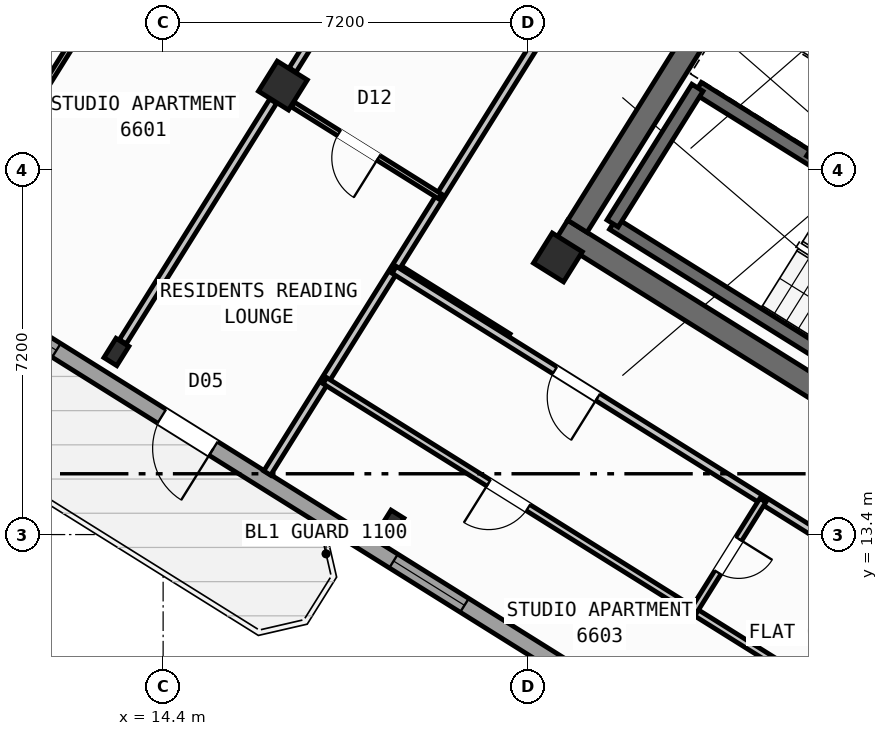
"""IFC4 building model, lengths in metres.
Left out: names, types, materials, properties, quantities, classifications, styles, units other than length and angle.
Written with IfcOpenShell. Run it as: python <this file> out.ifc"""

import sys

from ifc_helpers import new_model, si_unit, direction, frame, frame_2d, origin, origin_2d, place, context, subcontext, project, spatial, rectangle, hollow_rectangle, i_section, extrude, source, transform, mapped, element, fill, save


model = new_model("IFC4")
c1 = context("Model", 3, precision=1e-05, world=origin(), true_north=direction((0.0, 1.0)))
c2 = subcontext(c1, "Body", "Model", "MODEL_VIEW")
j1 = project(units=[si_unit("LENGTHUNIT", "METRE"), si_unit("PLANEANGLEUNIT", "RADIAN")], contexts=[c1])
p1 = place(None, origin())
s1 = spatial("IfcSite", under=j1, at=p1, CompositionType="ELEMENT")
p2 = place(p1, origin())
s2 = spatial("IfcBuilding", under=s1, at=p2, CompositionType="ELEMENT")
p3 = place(p2, frame((0.0, 0.0, 262.8)))
s3 = spatial("IfcBuildingStorey", under=s2, at=p3, CompositionType="ELEMENT", Elevation=262.8)
p4 = place(p3, frame((33.324, 12.503, 0.0), z_axis=(0.0, 0.0, 1.0), x_axis=(-0.848043529849, 0.529926571782, 0.0)))
e1 = element("IfcWall", 1, at=p4, inside=s3, PredefinedType="SHEAR", context=c2, shape_type="SweptSolid", body=[
    extrude(rectangle(XDim=13.04, YDim=0.45, at=frame_2d((6.52, 0.0))), origin(), (0.0, 0.0, 1.0), 3.35),
])
p5 = place(p3, frame((26.007, 24.976, 0.0), z_axis=(0.0, 0.0, 1.0), x_axis=(-0.529931155655, -0.848040665456, 0.0)))
e2 = element("IfcWall", 2, at=p5, inside=s3, PredefinedType="SHEAR", context=c2, shape_type="SweptSolid", body=[
    extrude(rectangle(XDim=6.475, YDim=0.45, at=frame_2d((3.238, 0.0))), origin(), (0.0, 0.0, 1.0), 3.35),
])
m1 = source(origin(), c2, "Body", "SweptSolid", [
    extrude(hollow_rectangle(XDim=0.7, YDim=0.7, WallThickness=0.028, at=origin_2d()), origin(), (0.0, 0.0, 1.0), 3.6),
])
p6 = place(p3, frame((22.191, 18.87, 0.0), z_axis=(0.0, 0.0, 1.0), x_axis=(-0.848048096156, 0.529919264233, 0.0)))
e3 = element("IfcColumn", 3, at=p6, inside=s3, PredefinedType="COLUMN", context=c2, shape_type="MappedRepresentation", body=[
    mapped(m1, transform((0.0, 0.0, 0.0), scale=1.0)),
])
m2 = source(origin(), c2, "Body", "SweptSolid", [
    extrude(i_section(OverallWidth=0.3, OverallDepth=0.45, WebThickness=0.014, FlangeThickness=0.026, at=origin_2d()), origin(), (0.0, 0.0, 1.0), 3.6),
])
p7 = place(p3, frame((18.906, 13.612, 0.0), z_axis=(0.0, 0.0, 1.0), x_axis=(-0.848048096156, 0.529919264233, 0.0)))
e4 = element("IfcColumn", 4, at=p7, inside=s3, PredefinedType="COLUMN", context=c2, shape_type="MappedRepresentation", body=[
    mapped(m2, transform((0.0, 0.0, 0.0), scale=1.0)),
])
p8 = place(p3, frame((16.764, 22.261, 0.0), z_axis=(0.0, 0.0, 1.0), x_axis=(-0.848048096156, 0.529919264233, 0.0)))
e5 = element("IfcColumn", 5, at=p8, inside=s3, PredefinedType="COLUMN", context=c2, shape_type="MappedRepresentation", body=[
    mapped(m1, transform((0.0, 0.0, 0.0), scale=1.0)),
])
p9 = place(p3, frame((13.478, 17.003, 0.0), z_axis=(0.0, 0.0, 1.0), x_axis=(-0.848048096156, 0.529919264233, 0.0)))
e6 = element("IfcColumn", 6, at=p9, inside=s3, PredefinedType="COLUMN", context=c2, shape_type="MappedRepresentation", body=[
    mapped(m2, transform((0.0, 0.0, 0.0), scale=1.0)),
])
p10 = place(p3, frame((29.268, 6.429, 0.0), z_axis=(0.0, 0.0, 1.0), x_axis=(-0.848049971435, 0.529916263149, 0.0)))
e7 = element("IfcWall", 7, at=p10, inside=s3, PredefinedType="STANDARD", context=c2, shape_type="SweptSolid", body=[
    extrude(rectangle(XDim=31.588, YDim=0.32, at=frame_2d((15.794, 0.0))), origin(), (0.0, 0.0, 1.0), 3.35),
])
p11 = place(p10, frame((16.362, 0.0, 0.0)))
e8 = element("IfcOpeningElement", 8, at=p11, cuts=e7, PredefinedType="OPENING", context=c2, shape_type="SweptSolid", body=[
    extrude(rectangle(XDim=1.2, YDim=2.15, at=frame_2d((0.6, 1.075))), frame((0.0, 0.17, 0.0), z_axis=(0.0, -1.0, 0.0), x_axis=(1.0, 0.0, 0.0)), (0.0, 0.0, 1.0), 0.34),
])
p12 = place(p10, frame((3.859, 0.0, 0.9)))
e9 = element("IfcOpeningElement", 9, at=p12, cuts=e7, PredefinedType="OPENING", context=c2, shape_type="SweptSolid", body=[
    extrude(rectangle(XDim=1.65, YDim=1.45, at=frame_2d((0.825, 0.725))), frame((0.0, 0.17, 0.0), z_axis=(0.0, -1.0, 0.0), x_axis=(1.0, 0.0, 0.0)), (0.0, 0.0, 1.0), 0.34),
])
p13 = place(p10, frame((10.519, 0.0, 0.9)))
e10 = element("IfcOpeningElement", 10, at=p13, cuts=e7, PredefinedType="OPENING", context=c2, shape_type="SweptSolid", body=[
    extrude(rectangle(XDim=1.65, YDim=1.45, at=frame_2d((0.825, 0.725))), frame((0.0, 0.17, 0.0), z_axis=(0.0, -1.0, 0.0), x_axis=(1.0, 0.0, 0.0)), (0.0, 0.0, 1.0), 0.34),
])
p14 = place(p10, frame((20.015, 0.0, 0.95)))
e11 = element("IfcOpeningElement", 11, at=p14, cuts=e7, PredefinedType="OPENING", context=c2, shape_type="SweptSolid", body=[
    extrude(rectangle(XDim=1.95, YDim=1.35, at=frame_2d((0.975, 0.675))), frame((0.0, 0.17, 0.0), z_axis=(0.0, -1.0, 0.0), x_axis=(1.0, 0.0, 0.0)), (0.0, 0.0, 1.0), 0.34),
])
p15 = place(p10, frame((23.715, 0.0, 1.0)))
e12 = element("IfcOpeningElement", 12, at=p15, cuts=e7, PredefinedType="OPENING", context=c2, shape_type="SweptSolid", body=[
    extrude(rectangle(XDim=0.9, YDim=1.25, at=frame_2d((0.45, 0.625))), frame((0.0, 0.17, 0.0), z_axis=(0.0, -1.0, 0.0), x_axis=(1.0, 0.0, 0.0)), (0.0, 0.0, 1.0), 0.34),
])
p16 = place(p10, frame((26.391, 0.0, 0.9)))
e13 = element("IfcOpeningElement", 13, at=p16, cuts=e7, PredefinedType="OPENING", context=c2, shape_type="SweptSolid", body=[
    extrude(rectangle(XDim=1.65, YDim=1.45, at=frame_2d((0.825, 0.725))), frame((0.0, 0.17, 0.0), z_axis=(0.0, -1.0, 0.0), x_axis=(1.0, 0.0, 0.0)), (0.0, 0.0, 1.0), 0.34),
])
p17 = place(p10, frame((29.878, 0.0, 1.0)))
e14 = element("IfcOpeningElement", 14, at=p17, cuts=e7, PredefinedType="OPENING", context=c2, shape_type="SweptSolid", body=[
    extrude(rectangle(XDim=0.9, YDim=1.25, at=frame_2d((0.45, 0.625))), frame((0.0, 0.17, 0.0), z_axis=(0.0, -1.0, 0.0), x_axis=(1.0, 0.0, 0.0)), (0.0, 0.0, 1.0), 0.34),
])
p18 = place(p3, frame((29.605, 15.581, 0.0), z_axis=(0.0, 0.0, 1.0), x_axis=(-0.848036911448, 0.529937163087, 0.0)))
e15 = element("IfcWall", 15, at=p18, inside=s3, PredefinedType="SHEAR", context=c2, shape_type="SweptSolid", body=[
    extrude(rectangle(XDim=7.46, YDim=0.26, at=frame_2d((3.73, 0.0))), origin(), (0.0, 0.0, 1.0), 3.35),
])
p19 = place(p3, frame((31.28, 18.261, 0.0), z_axis=(0.0, 0.0, 1.0), x_axis=(-0.848051618787, 0.529913626805, 0.0)))
e16 = element("IfcWall", 16, at=p19, inside=s3, PredefinedType="SHEAR", context=c2, shape_type="SweptSolid", body=[
    extrude(rectangle(XDim=7.46, YDim=0.26, at=frame_2d((3.73, 0.0))), origin(), (0.0, 0.0, 1.0), 3.35),
])
p20 = place(p19, frame((0.36, 0.0, 0.0)))
e17 = element("IfcOpeningElement", 17, at=p20, cuts=e16, PredefinedType="OPENING", context=c2, shape_type="SweptSolid", body=[
    extrude(rectangle(XDim=0.86, YDim=2.05, at=frame_2d((0.43, 1.025))), frame((0.0, 0.14, 0.0), z_axis=(0.0, -1.0, 0.0), x_axis=(1.0, 0.0, 0.0)), (0.0, 0.0, 1.0), 0.28),
])
p21 = place(p3, frame((24.945, 22.22, 0.0), z_axis=(0.0, 0.0, 1.0), x_axis=(-0.529908658664, -0.84805472316, 0.0)))
e18 = element("IfcWall", 18, at=p21, inside=s3, PredefinedType="SHEAR", context=c2, shape_type="SweptSolid", body=[
    extrude(rectangle(XDim=3.16, YDim=0.26, at=frame_2d((1.58, 0.0))), origin(), (0.0, 0.0, 1.0), 3.35),
])
p22 = place(p3, frame((28.71, 23.263, 0.0), z_axis=(0.0, 0.0, 1.0), x_axis=(-0.529907497854, -0.848055448493, 0.0)))
e19 = element("IfcWall", 19, at=p22, inside=s3, PredefinedType="STANDARD", context=c2, shape_type="SweptSolid", body=[
    extrude(rectangle(XDim=2.88, YDim=0.2, at=frame_2d((1.44, 0.0))), origin(), (0.0, 0.0, 1.0), 3.34),
])
p23 = place(p3, frame((31.525, 21.504, 0.0), z_axis=(0.0, 0.0, 1.0), x_axis=(-0.848042066329, 0.529928913853, 0.0)))
e20 = element("IfcWall", 20, at=p23, inside=s3, PredefinedType="STANDARD", context=c2, shape_type="SweptSolid", body=[
    extrude(rectangle(XDim=6.268, YDim=0.2, at=frame_2d((3.134, 0.0))), origin(), (0.0, 0.0, 1.0), 3.34),
])
p24 = place(p23, frame((4.4, 0.0, 0.0)))
e21 = element("IfcOpeningElement", 21, at=p24, cuts=e20, PredefinedType="OPENING", context=c2, shape_type="SweptSolid", body=[
    extrude(rectangle(XDim=0.86, YDim=2.05, at=frame_2d((0.43, 1.025))), frame((0.0, 0.11, 0.0), z_axis=(0.0, -1.0, 0.0), x_axis=(1.0, 0.0, 0.0)), (0.0, 0.0, 1.0), 0.22),
])
p25 = place(p23, frame((1.45, 0.0, 0.0)))
e22 = element("IfcOpeningElement", 22, at=p25, cuts=e20, PredefinedType="OPENING", context=c2, shape_type="SweptSolid", body=[
    extrude(rectangle(XDim=0.86, YDim=2.05, at=frame_2d((0.43, 1.025))), frame((0.0, 0.11, 0.0), z_axis=(0.0, -1.0, 0.0), x_axis=(1.0, 0.0, 0.0)), (0.0, 0.0, 1.0), 0.22),
])
p26 = place(p3, frame((21.206, 17.292, 0.0), z_axis=(0.0, 0.0, 1.0), x_axis=(-0.848050851465, 0.529914854792, 0.0)))
e23 = element("IfcWall", 23, at=p26, inside=s3, PredefinedType="PARTITIONING", context=c2, shape_type="SweptSolid", body=[
    extrude(rectangle(XDim=2.61, YDim=0.16, at=frame_2d((1.305, 0.0))), origin(), (0.0, 0.0, 1.0), 3.34),
])
p27 = place(p3, frame((25.198, 28.606, 0.0), z_axis=(0.0, 0.0, 1.0), x_axis=(-0.529921796515, -0.848046513806, 0.0)))
e24 = element("IfcWall", 24, at=p27, inside=s3, PredefinedType="PARTITIONING", context=c2, shape_type="SweptSolid", body=[
    extrude(rectangle(XDim=16.5, YDim=0.16, at=frame_2d((8.25, 0.0))), origin(), (0.0, 0.0, 1.0), 3.34),
])
p28 = place(p3, frame((20.44, 28.145, 0.0), z_axis=(0.0, 0.0, 1.0), x_axis=(-0.529938869374, -0.84803584519, 0.0)))
e25 = element("IfcWall", 25, at=p28, inside=s3, PredefinedType="PARTITIONING", context=c2, shape_type="SweptSolid", body=[
    extrude(rectangle(XDim=6.576, YDim=0.16, at=frame_2d((3.288, 0.0))), origin(), (0.0, 0.0, 1.0), 2.875),
])
p29 = place(p3, frame((16.572, 21.954, 0.0), z_axis=(0.0, 0.0, 1.0), x_axis=(-0.529904903214, -0.848057069748, 0.0)))
e26 = element("IfcWall", 26, at=p29, inside=s3, PredefinedType="PARTITIONING", context=c2, shape_type="SweptSolid", body=[
    extrude(rectangle(XDim=5.601, YDim=0.16, at=frame_2d((2.801, 0.0))), origin(), (0.0, 0.0, 1.0), 2.875),
])
p30 = place(p3, frame((19.865, 20.073, 0.0), z_axis=(0.0, 0.0, 1.0), x_axis=(-0.84807831592, 0.529870899433, 0.0)))
e27 = element("IfcWall", 27, at=p30, inside=s3, PredefinedType="PARTITIONING", context=c2, shape_type="SweptSolid", body=[
    extrude(rectangle(XDim=3.428, YDim=0.11, at=frame_2d((1.714, 0.0))), origin(), (0.0, 0.0, 1.0), 2.875),
])
p31 = place(p30, frame((1.435, 0.0, 0.0)))
e28 = element("IfcOpeningElement", 28, at=p31, cuts=e27, PredefinedType="OPENING", context=c2, shape_type="SweptSolid", body=[
    extrude(rectangle(XDim=0.92, YDim=2.08, at=frame_2d((0.46, 1.04))), frame((0.0, 0.065, 0.0), z_axis=(0.0, -1.0, 0.0), x_axis=(1.0, 0.0, 0.0)), (0.0, 0.0, 1.0), 0.13),
])
p32 = place(p3, frame((16.191, 28.833, 0.0), z_axis=(0.0, 0.0, 1.0), x_axis=(-0.529921526101, -0.84804668278, 0.0)))
e29 = element("IfcWall", 29, at=p32, inside=s3, PredefinedType="PARTITIONING", context=c2, shape_type="SweptSolid", body=[
    extrude(rectangle(XDim=12.19, YDim=0.11, at=frame_2d((6.095, 0.0))), origin(), (0.0, 0.0, 1.0), 3.34),
])
p33 = place(p32, frame((0.35, 0.0, 0.0)))
e30 = element("IfcOpeningElement", 30, at=p33, cuts=e29, PredefinedType="OPENING", context=c2, shape_type="SweptSolid", body=[
    extrude(rectangle(XDim=0.92, YDim=2.08, at=frame_2d((0.46, 1.04))), frame((0.0, 0.065, 0.0), z_axis=(0.0, -1.0, 0.0), x_axis=(1.0, 0.0, 0.0)), (0.0, 0.0, 1.0), 0.13),
])
p34 = place(p3, frame((13.486, 35.924, 0.0), z_axis=(0.0, 0.0, 1.0), x_axis=(-0.529920421309, -0.848047373134, 0.0)))
e31 = element("IfcWall", 31, at=p34, inside=s3, PredefinedType="PARTITIONING", context=c2, shape_type="SweptSolid", body=[
    extrude(rectangle(XDim=16.77, YDim=0.11, at=frame_2d((8.385, 0.0))), origin(), (0.0, 0.0, 1.0), 3.34),
])
p35 = place(p34, frame((0.76, 0.0, 0.0)))
e32 = element("IfcOpeningElement", 32, at=p35, cuts=e31, PredefinedType="OPENING", context=c2, shape_type="SweptSolid", body=[
    extrude(rectangle(XDim=0.78, YDim=2.05, at=frame_2d((0.39, 1.025))), frame((0.0, 0.065, 0.0), z_axis=(0.0, -1.0, 0.0), x_axis=(1.0, 0.0, 0.0)), (0.0, 0.0, 1.0), 0.13),
])
p36 = place(p34, frame((5.967, 0.0, 0.0)))
e33 = element("IfcOpeningElement", 33, at=p36, cuts=e31, PredefinedType="OPENING", context=c2, shape_type="SweptSolid", body=[
    extrude(rectangle(XDim=0.92, YDim=2.08, at=frame_2d((0.46, 1.04))), frame((0.0, 0.065, 0.0), z_axis=(0.0, -1.0, 0.0), x_axis=(1.0, 0.0, 0.0)), (0.0, 0.0, 1.0), 0.13),
])
p37 = place(p3, frame((32.164, 10.374, 0.0), z_axis=(0.0, 0.0, 1.0), x_axis=(-0.848044107957, 0.529925646633, 0.0)))
e34 = element("IfcWall", 34, at=p37, inside=s3, PredefinedType="PARTITIONING", context=c2, shape_type="SweptSolid", body=[
    extrude(rectangle(XDim=15.57, YDim=0.16, at=frame_2d((7.785, 0.0))), origin(), (0.0, 0.0, 1.0), 3.34),
])
p38 = place(p37, frame((10.83, 0.0, 0.0)))
e35 = element("IfcOpeningElement", 35, at=p38, cuts=e34, PredefinedType="OPENING", context=c2, shape_type="SweptSolid", body=[
    extrude(rectangle(XDim=1.0, YDim=2.1, at=frame_2d((0.5, 1.05))), frame((0.0, 0.09, 0.0), z_axis=(0.0, -1.0, 0.0), x_axis=(1.0, 0.0, 0.0)), (0.0, 0.0, 1.0), 0.18),
])
p39 = place(p3, frame((29.72, 8.859, 0.0), z_axis=(0.0, 0.0, 1.0), x_axis=(-0.848049134363, 0.529917602752, 0.0)))
e36 = element("IfcWall", 36, at=p39, inside=s3, PredefinedType="PLUMBINGWALL", context=c2, shape_type="SweptSolid", body=[
    extrude(rectangle(XDim=14.3, YDim=0.14, at=frame_2d((7.15, 0.0))), origin(), (0.0, 0.0, 1.0), 3.34),
])
p40 = place(p39, frame((9.57, 0.0, 0.0)))
e37 = element("IfcOpeningElement", 37, at=p40, cuts=e36, PredefinedType="OPENING", context=c2, shape_type="SweptSolid", body=[
    extrude(rectangle(XDim=0.92, YDim=2.08, at=frame_2d((0.46, 1.04))), frame((0.0, 0.08, 0.0), z_axis=(0.0, -1.0, 0.0), x_axis=(1.0, 0.0, 0.0)), (0.0, 0.0, 1.0), 0.16),
])
p41 = place(p3, frame((26.237, 14.078, 0.0), z_axis=(0.0, 0.0, 1.0), x_axis=(-0.52995640672, -0.848024885824, 0.0)))
e38 = element("IfcWall", 38, at=p41, inside=s3, PredefinedType="PLUMBINGWALL", context=c2, shape_type="SweptSolid", body=[
    extrude(rectangle(XDim=2.58, YDim=0.14, at=frame_2d((1.29, 0.0))), origin(), (0.0, 0.0, 1.0), 3.34),
])
p42 = place(p41, frame((0.9, 0.0, 0.0)))
e39 = element("IfcOpeningElement", 39, at=p42, cuts=e38, PredefinedType="OPENING", context=c2, shape_type="SweptSolid", body=[
    extrude(rectangle(XDim=0.78, YDim=2.05, at=frame_2d((0.39, 1.025))), frame((0.0, 0.08, 0.0), z_axis=(0.0, -1.0, 0.0), x_axis=(1.0, 0.0, 0.0)), (0.0, 0.0, 1.0), 0.16),
])
m3 = source(origin(), c2, "Body", "SweptSolid", [
    extrude(rectangle(XDim=1.2, YDim=2.15, at=frame_2d((0.6, 1.075))), frame((0.0, 0.025, 0.0), z_axis=(0.0, -1.0, 0.0), x_axis=(1.0, 0.0, 0.0)), (0.0, 0.0, 1.0), 0.05),
])
p43 = place(p11, origin())
e40 = element("IfcDoor", 40, at=p43, inside=s3, OperationType="SINGLE_SWING_LEFT", PredefinedType="DOOR", context=c2, shape_type="MappedRepresentation", body=[
    mapped(m3, transform((0.0, 0.0, 0.0), scale=1.0)),
])
fill(e8, e40)
m4 = source(origin(), c2, "Body", "SweptSolid", [
    extrude(rectangle(XDim=1.65, YDim=1.45, at=frame_2d((0.825, 0.725))), frame((0.0, 0.03, 0.0), z_axis=(0.0, -1.0, 0.0), x_axis=(1.0, 0.0, 0.0)), (0.0, 0.0, 1.0), 0.06),
])
p44 = place(p13, origin())
e41 = element("IfcWindow", 41, at=p44, inside=s3, PartitioningType="SINGLE_PANEL", PredefinedType="WINDOW", context=c2, shape_type="MappedRepresentation", body=[
    mapped(m4, transform((0.0, 0.0, 0.0), scale=1.0)),
])
fill(e10, e41)
m5 = source(origin(), c2, "Body", "SweptSolid", [
    extrude(rectangle(XDim=1.95, YDim=1.35, at=frame_2d((0.975, 0.675))), frame((0.0, 0.03, 0.0), z_axis=(0.0, -1.0, 0.0), x_axis=(1.0, 0.0, 0.0)), (0.0, 0.0, 1.0), 0.06),
])
p45 = place(p14, origin())
e42 = element("IfcWindow", 42, at=p45, inside=s3, PartitioningType="SINGLE_PANEL", PredefinedType="WINDOW", context=c2, shape_type="MappedRepresentation", body=[
    mapped(m5, transform((0.0, 0.0, 0.0), scale=1.0)),
])
fill(e11, e42)
m6 = source(origin(), c2, "Body", "SweptSolid", [
    extrude(rectangle(XDim=0.92, YDim=2.08, at=frame_2d((0.46, 1.04))), frame((0.0, 0.025, 0.0), z_axis=(0.0, -1.0, 0.0), x_axis=(1.0, 0.0, 0.0)), (0.0, 0.0, 1.0), 0.05),
])
p46 = place(p31, origin())
e43 = element("IfcDoor", 43, at=p46, inside=s3, OperationType="SINGLE_SWING_LEFT", PredefinedType="DOOR", context=c2, shape_type="MappedRepresentation", body=[
    mapped(m6, transform((0.0, 0.0, 0.0), scale=1.0)),
])
fill(e28, e43)
m7 = source(origin(), c2, "Body", "SweptSolid", [
    extrude(rectangle(XDim=1.0, YDim=2.1, at=frame_2d((0.5, 1.05))), frame((0.0, 0.025, 0.0), z_axis=(0.0, -1.0, 0.0), x_axis=(1.0, 0.0, 0.0)), (0.0, 0.0, 1.0), 0.05),
])
p47 = place(p38, origin())
e44 = element("IfcDoor", 44, at=p47, inside=s3, OperationType="SINGLE_SWING_LEFT", PredefinedType="DOOR", context=c2, shape_type="MappedRepresentation", body=[
    mapped(m7, transform((0.0, 0.0, 0.0), scale=1.0)),
])
fill(e35, e44)
p48 = place(p40, origin())
e45 = element("IfcDoor", 45, at=p48, inside=s3, OperationType="SINGLE_SWING_RIGHT", PredefinedType="DOOR", context=c2, shape_type="MappedRepresentation", body=[
    mapped(m6, transform((0.0, 0.0, 0.0), scale=1.0)),
])
fill(e37, e45)
m8 = source(origin(), c2, "Body", "SweptSolid", [
    extrude(rectangle(XDim=0.78, YDim=2.05, at=frame_2d((0.39, 1.025))), frame((0.0, 0.025, 0.0), z_axis=(0.0, -1.0, 0.0), x_axis=(1.0, 0.0, 0.0)), (0.0, 0.0, 1.0), 0.05),
])
p49 = place(p42, origin())
e46 = element("IfcDoor", 46, at=p49, inside=s3, OperationType="SINGLE_SWING_LEFT", PredefinedType="DOOR", context=c2, shape_type="MappedRepresentation", body=[
    mapped(m8, transform((0.0, 0.0, 0.0), scale=1.0)),
])
fill(e39, e46)
save(model, sys.argv[1])
